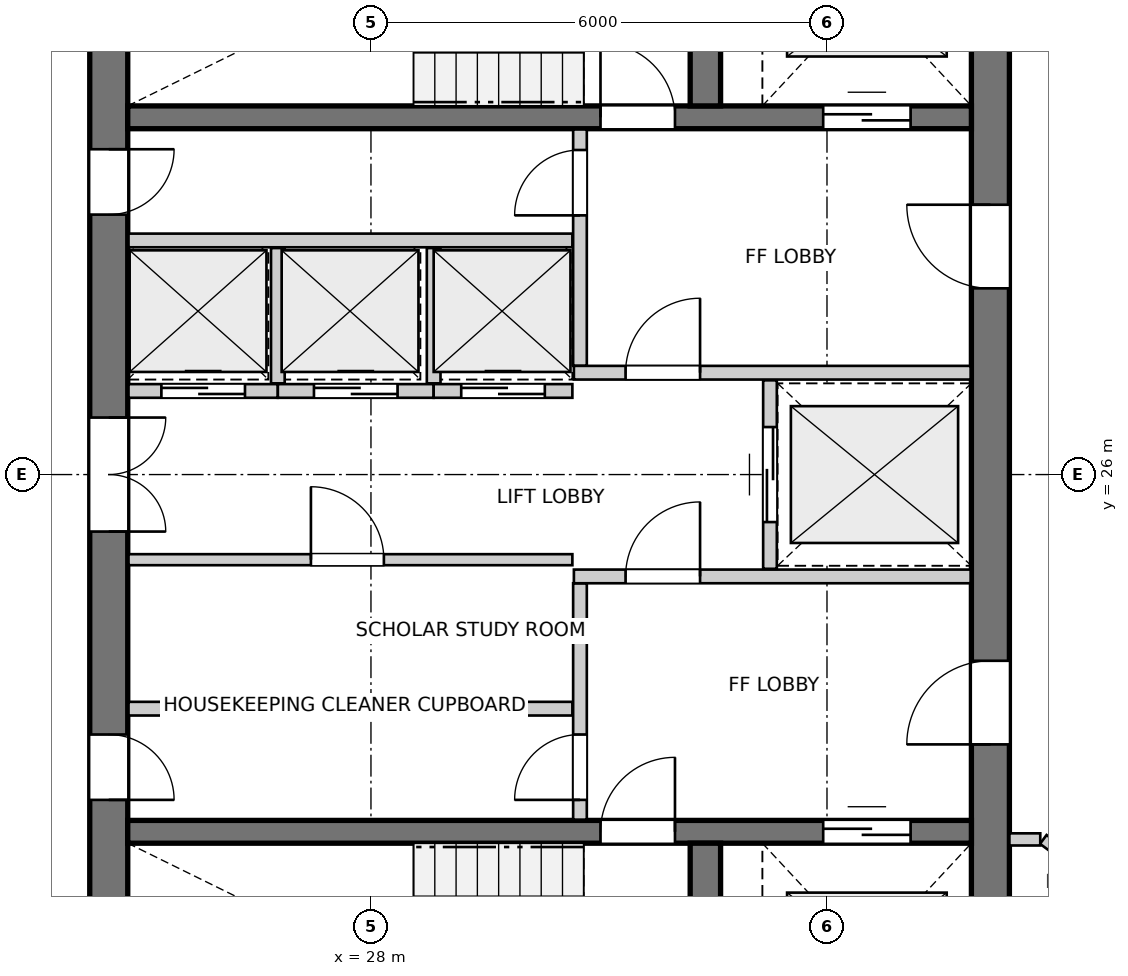
"""IFC4 building model, lengths in metres.
Left out: names, types, materials, properties, quantities, classifications, styles, units other than length and angle.
Written with IfcOpenShell. Run it as: python <this file> out.ifc"""

import sys

from ifc_helpers import new_model, si_unit, direction, frame, frame_2d, origin, place, context, subcontext, project, spatial, rectangle, extrude, source, transform, mapped, element, fill, save


model = new_model("IFC4")
c1 = context("Model", 3, precision=1e-05, world=origin(), true_north=direction((0.0, 1.0)))
c2 = subcontext(c1, "Body", "Model", "MODEL_VIEW")
j1 = project(units=[si_unit("LENGTHUNIT", "METRE"), si_unit("PLANEANGLEUNIT", "RADIAN")], contexts=[c1])
p1 = place(None, origin())
s1 = spatial("IfcSite", under=j1, at=p1, CompositionType="ELEMENT")
p2 = place(p1, origin())
s2 = spatial("IfcBuilding", under=s1, at=p2, CompositionType="ELEMENT")
p3 = place(p2, frame((0.0, 0.0, 195.6)))
s3 = spatial("IfcBuildingStorey", under=s2, at=p3, CompositionType="ELEMENT", Elevation=195.6)
p4 = place(p3, frame((24.55, 33.8, 0.0), z_axis=(0.0, 0.0, 1.0), x_axis=(0.0, -1.0, 0.0)))
e1 = element("IfcWall", 1, at=p4, inside=s3, PredefinedType="SHEAR", context=c2, shape_type="SweptSolid", body=[
    extrude(rectangle(XDim=15.6, YDim=0.5, at=frame_2d((7.8, 0.0))), origin(), (0.0, 0.0, 1.0), 2.96),
])
p5 = place(p4, frame((7.05, 0.0, 0.0)))
e2 = element("IfcOpeningElement", 2, at=p5, cuts=e1, PredefinedType="OPENING", context=c2, shape_type="SweptSolid", body=[
    extrude(rectangle(XDim=1.5, YDim=2.15, at=frame_2d((0.75, 1.075))), frame((0.0, 0.26, 0.0), z_axis=(0.0, -1.0, 0.0), x_axis=(1.0, 0.0, 0.0)), (0.0, 0.0, 1.0), 0.52),
])
p6 = place(p4, frame((3.52, 0.0, 0.0)))
e3 = element("IfcOpeningElement", 3, at=p6, cuts=e1, PredefinedType="OPENING", context=c2, shape_type="SweptSolid", body=[
    extrude(rectangle(XDim=0.86, YDim=2.05, at=frame_2d((0.43, 1.025))), frame((0.0, 0.26, 0.0), z_axis=(0.0, -1.0, 0.0), x_axis=(1.0, 0.0, 0.0)), (0.0, 0.0, 1.0), 0.52),
])
p7 = place(p4, frame((11.22, 0.0, 0.0)))
e4 = element("IfcOpeningElement", 4, at=p7, cuts=e1, PredefinedType="OPENING", context=c2, shape_type="SweptSolid", body=[
    extrude(rectangle(XDim=0.86, YDim=2.05, at=frame_2d((0.43, 1.025))), frame((0.0, 0.26, 0.0), z_axis=(0.0, -1.0, 0.0), x_axis=(1.0, 0.0, 0.0)), (0.0, 0.0, 1.0), 0.52),
])
p8 = place(p3, frame((36.15, 18.2, 0.0), z_axis=(0.0, 0.0, 1.0), x_axis=(0.0, 1.0, 0.0)))
e5 = element("IfcWall", 5, at=p8, inside=s3, PredefinedType="SHEAR", context=c2, shape_type="SweptSolid", body=[
    extrude(rectangle(XDim=15.6, YDim=0.5, at=frame_2d((7.8, 0.0))), origin(), (0.0, 0.0, 1.0), 2.96),
])
p9 = place(p8, frame((4.25, 0.0, 0.0)))
e6 = element("IfcOpeningElement", 6, at=p9, cuts=e5, PredefinedType="OPENING", context=c2, shape_type="SweptSolid", body=[
    extrude(rectangle(XDim=1.1, YDim=2.15, at=frame_2d((0.55, 1.075))), frame((0.0, 0.26, 0.0), z_axis=(0.0, -1.0, 0.0), x_axis=(1.0, 0.0, 0.0)), (0.0, 0.0, 1.0), 0.52),
])
p10 = place(p8, frame((10.25, 0.0, 0.0)))
e7 = element("IfcOpeningElement", 7, at=p10, cuts=e5, PredefinedType="OPENING", context=c2, shape_type="SweptSolid", body=[
    extrude(rectangle(XDim=1.1, YDim=2.15, at=frame_2d((0.55, 1.075))), frame((0.0, 0.26, 0.0), z_axis=(0.0, -1.0, 0.0), x_axis=(1.0, 0.0, 0.0)), (0.0, 0.0, 1.0), 0.52),
])
p11 = place(p3, frame((24.8, 21.3, 0.0), z_axis=(0.0, 0.0, 1.0), x_axis=(1.0, 0.0, 0.0)))
e8 = element("IfcWall", 8, at=p11, inside=s3, PredefinedType="SHEAR", context=c2, shape_type="SweptSolid", body=[
    extrude(rectangle(XDim=11.1, YDim=0.3, at=frame_2d((5.55, 0.0))), origin(), (0.0, 0.0, 1.0), 2.96),
])
p12 = place(p11, frame((6.22, 0.0, 0.0)))
e9 = element("IfcOpeningElement", 9, at=p12, cuts=e8, PredefinedType="OPENING", context=c2, shape_type="SweptSolid", body=[
    extrude(rectangle(XDim=0.98, YDim=2.15, at=frame_2d((0.49, 1.075))), frame((0.0, 0.16, 0.0), z_axis=(0.0, -1.0, 0.0), x_axis=(1.0, 0.0, 0.0)), (0.0, 0.0, 1.0), 0.32),
])
p13 = place(p11, frame((9.15, 0.0, 0.0)))
e10 = element("IfcOpeningElement", 10, at=p13, cuts=e8, PredefinedType="OPENING", context=c2, shape_type="SweptSolid", body=[
    extrude(rectangle(XDim=1.15, YDim=2.15, at=frame_2d((0.575, 1.075))), frame((0.0, 0.16, 0.0), z_axis=(0.0, -1.0, 0.0), x_axis=(1.0, 0.0, 0.0)), (0.0, 0.0, 1.0), 0.32),
])
p14 = place(p3, frame((32.4, 18.2, 0.0), z_axis=(0.0, 0.0, 1.0), x_axis=(0.0, 1.0, 0.0)))
e11 = element("IfcWall", 11, at=p14, inside=s3, PredefinedType="SHEAR", context=c2, shape_type="SweptSolid", body=[
    extrude(rectangle(XDim=2.95, YDim=0.4, at=frame_2d((1.475, 0.0))), origin(), (0.0, 0.0, 1.0), 2.96),
])
p15 = place(p3, frame((24.8, 30.7, 0.0), z_axis=(0.0, 0.0, 1.0), x_axis=(1.0, 0.0, 0.0)))
e12 = element("IfcWall", 12, at=p15, inside=s3, PredefinedType="SHEAR", context=c2, shape_type="SweptSolid", body=[
    extrude(rectangle(XDim=11.1, YDim=0.3, at=frame_2d((5.55, 0.0))), origin(), (0.0, 0.0, 1.0), 2.96),
])
p16 = place(p15, frame((6.22, 0.0, 0.0)))
e13 = element("IfcOpeningElement", 13, at=p16, cuts=e12, PredefinedType="OPENING", context=c2, shape_type="SweptSolid", body=[
    extrude(rectangle(XDim=0.98, YDim=2.15, at=frame_2d((0.49, 1.075))), frame((0.0, 0.16, 0.0), z_axis=(0.0, -1.0, 0.0), x_axis=(1.0, 0.0, 0.0)), (0.0, 0.0, 1.0), 0.32),
])
p17 = place(p15, frame((9.15, 0.0, 0.0)))
e14 = element("IfcOpeningElement", 14, at=p17, cuts=e12, PredefinedType="OPENING", context=c2, shape_type="SweptSolid", body=[
    extrude(rectangle(XDim=1.15, YDim=2.15, at=frame_2d((0.575, 1.075))), frame((0.0, 0.16, 0.0), z_axis=(0.0, -1.0, 0.0), x_axis=(1.0, 0.0, 0.0)), (0.0, 0.0, 1.0), 0.32),
])
p18 = place(p3, frame((32.4, 30.85, 0.0), z_axis=(0.0, 0.0, 1.0), x_axis=(0.0, 1.0, 0.0)))
e15 = element("IfcWall", 15, at=p18, inside=s3, PredefinedType="SHEAR", context=c2, shape_type="SweptSolid", body=[
    extrude(rectangle(XDim=2.95, YDim=0.4, at=frame_2d((1.475, 0.0))), origin(), (0.0, 0.0, 1.0), 2.96),
])
p19 = place(p3, frame((30.75, 21.46, 0.0), z_axis=(0.0, 0.0, 1.0), x_axis=(0.0, 1.0, 0.0)))
e16 = element("IfcWall", 16, at=p19, inside=s3, PredefinedType="PARTITIONING", context=c2, shape_type="SweptSolid", body=[
    extrude(rectangle(XDim=3.11, YDim=0.18, at=frame_2d((1.555, 0.0))), origin(), (0.0, 0.0, 1.0), 2.96),
])
p20 = place(p19, frame((0.26, 0.0, 0.0)))
e17 = element("IfcOpeningElement", 17, at=p20, cuts=e16, PredefinedType="OPENING", context=c2, shape_type="SweptSolid", body=[
    extrude(rectangle(XDim=0.86, YDim=2.05, at=frame_2d((0.43, 1.025))), frame((0.0, 0.1, 0.0), z_axis=(0.0, -1.0, 0.0), x_axis=(1.0, 0.0, 0.0)), (0.0, 0.0, 1.0), 0.2),
])
p21 = place(p3, frame((30.67, 24.66, 0.0), z_axis=(0.0, 0.0, 1.0), x_axis=(1.0, 0.0, 0.0)))
e18 = element("IfcWall", 18, at=p21, inside=s3, PredefinedType="PARTITIONING", context=c2, shape_type="SweptSolid", body=[
    extrude(rectangle(XDim=5.22, YDim=0.18, at=frame_2d((2.61, 0.0))), origin(), (0.0, 0.0, 1.0), 2.96),
])
p22 = place(p21, frame((0.68, 0.0, 0.0)))
e19 = element("IfcOpeningElement", 19, at=p22, cuts=e18, PredefinedType="OPENING", context=c2, shape_type="SweptSolid", body=[
    extrude(rectangle(XDim=0.98, YDim=2.15, at=frame_2d((0.49, 1.075))), frame((0.0, 0.1, 0.0), z_axis=(0.0, -1.0, 0.0), x_axis=(1.0, 0.0, 0.0)), (0.0, 0.0, 1.0), 0.2),
])
p23 = place(p3, frame((30.75, 27.43, 0.0), z_axis=(0.0, 0.0, 1.0), x_axis=(0.0, 1.0, 0.0)))
e20 = element("IfcWall", 20, at=p23, inside=s3, PredefinedType="PARTITIONING", context=c2, shape_type="SweptSolid", body=[
    extrude(rectangle(XDim=3.11, YDim=0.18, at=frame_2d((1.555, 0.0))), origin(), (0.0, 0.0, 1.0), 2.96),
])
p24 = place(p23, frame((1.98, 0.0, 0.0)))
e21 = element("IfcOpeningElement", 21, at=p24, cuts=e20, PredefinedType="OPENING", context=c2, shape_type="SweptSolid", body=[
    extrude(rectangle(XDim=0.86, YDim=2.05, at=frame_2d((0.43, 1.025))), frame((0.0, 0.1, 0.0), z_axis=(0.0, -1.0, 0.0), x_axis=(1.0, 0.0, 0.0)), (0.0, 0.0, 1.0), 0.2),
])
p25 = place(p3, frame((30.67, 27.34, 0.0), z_axis=(0.0, 0.0, 1.0), x_axis=(1.0, 0.0, 0.0)))
e22 = element("IfcWall", 22, at=p25, inside=s3, PredefinedType="PARTITIONING", context=c2, shape_type="SweptSolid", body=[
    extrude(rectangle(XDim=5.22, YDim=0.18, at=frame_2d((2.61, 0.0))), origin(), (0.0, 0.0, 1.0), 2.96),
])
p26 = place(p25, frame((0.68, 0.0, 0.0)))
e23 = element("IfcOpeningElement", 23, at=p26, cuts=e22, PredefinedType="OPENING", context=c2, shape_type="SweptSolid", body=[
    extrude(rectangle(XDim=0.98, YDim=2.15, at=frame_2d((0.49, 1.075))), frame((0.0, 0.1, 0.0), z_axis=(0.0, -1.0, 0.0), x_axis=(1.0, 0.0, 0.0)), (0.0, 0.0, 1.0), 0.2),
])
p27 = place(p3, frame((33.25, 24.76, 0.0), z_axis=(0.0, 0.0, 1.0), x_axis=(0.0, 1.0, 0.0)))
e24 = element("IfcWall", 24, at=p27, inside=s3, PredefinedType="PARTITIONING", context=c2, shape_type="SweptSolid", body=[
    extrude(rectangle(XDim=2.48, YDim=0.18, at=frame_2d((1.24, 0.0))), origin(), (0.0, 0.0, 1.0), 2.96),
])
p28 = place(p27, frame((0.615, 0.0, 0.0)))
e25 = element("IfcOpeningElement", 25, at=p28, cuts=e24, PredefinedType="OPENING", context=c2, shape_type="SweptSolid", body=[
    extrude(rectangle(XDim=1.25, YDim=2.15, at=frame_2d((0.625, 1.075))), frame((0.0, 0.1, 0.0), z_axis=(0.0, -1.0, 0.0), x_axis=(1.0, 0.0, 0.0)), (0.0, 0.0, 1.0), 0.2),
])
p29 = place(p3, frame((24.81, 22.92, 0.0), z_axis=(0.0, 0.0, 1.0), x_axis=(1.0, 0.0, 0.0)))
e26 = element("IfcWall", 26, at=p29, inside=s3, PredefinedType="PARTITIONING", context=c2, shape_type="SweptSolid", body=[
    extrude(rectangle(XDim=5.84, YDim=0.18, at=frame_2d((2.92, 0.0))), origin(), (0.0, 0.0, 1.0), 2.96),
])
p30 = place(p3, frame((24.81, 24.88, 0.0), z_axis=(0.0, 0.0, 1.0), x_axis=(1.0, 0.0, 0.0)))
e27 = element("IfcWall", 27, at=p30, inside=s3, PredefinedType="PARTITIONING", context=c2, shape_type="SweptSolid", body=[
    extrude(rectangle(XDim=5.84, YDim=0.145, at=frame_2d((2.92, 0.0))), origin(), (0.0, 0.0, 1.0), 2.96),
])
p31 = place(p30, frame((2.4, 0.0, 0.0)))
e28 = element("IfcOpeningElement", 28, at=p31, cuts=e27, PredefinedType="OPENING", context=c2, shape_type="SweptSolid", body=[
    extrude(rectangle(XDim=0.96, YDim=2.1, at=frame_2d((0.48, 1.05))), frame((0.0, 0.083, 0.0), z_axis=(0.0, -1.0, 0.0), x_axis=(1.0, 0.0, 0.0)), (0.0, 0.0, 1.0), 0.165),
])
p32 = place(p3, frame((24.81, 29.08, 0.0), z_axis=(0.0, 0.0, 1.0), x_axis=(1.0, 0.0, 0.0)))
e29 = element("IfcWall", 29, at=p32, inside=s3, PredefinedType="PARTITIONING", context=c2, shape_type="SweptSolid", body=[
    extrude(rectangle(XDim=5.84, YDim=0.18, at=frame_2d((2.92, 0.0))), origin(), (0.0, 0.0, 1.0), 2.96),
])
p33 = place(p3, frame((24.81, 27.1, 0.0), z_axis=(0.0, 0.0, 1.0), x_axis=(1.0, 0.0, 0.0)))
e30 = element("IfcWall", 30, at=p33, inside=s3, PredefinedType="PARTITIONING", context=c2, shape_type="SweptSolid", body=[
    extrude(rectangle(XDim=1.965, YDim=0.18, at=frame_2d((0.982, 0.0))), origin(), (0.0, 0.0, 1.0), 2.96),
])
p34 = place(p33, frame((0.433, 0.0, 0.0)))
e31 = element("IfcOpeningElement", 31, at=p34, cuts=e30, PredefinedType="OPENING", context=c2, shape_type="SweptSolid", body=[
    extrude(rectangle(XDim=1.1, YDim=2.15, at=frame_2d((0.55, 1.075))), frame((0.0, 0.1, 0.0), z_axis=(0.0, -1.0, 0.0), x_axis=(1.0, 0.0, 0.0)), (0.0, 0.0, 1.0), 0.2),
])
p35 = place(p3, frame((26.775, 27.1, 0.0), z_axis=(0.0, 0.0, 1.0), x_axis=(1.0, 0.0, 0.0)))
e32 = element("IfcWall", 32, at=p35, inside=s3, PredefinedType="PARTITIONING", context=c2, shape_type="SweptSolid", body=[
    extrude(rectangle(XDim=2.05, YDim=0.18, at=frame_2d((1.025, 0.0))), origin(), (0.0, 0.0, 1.0), 2.96),
])
p36 = place(p35, frame((0.475, 0.0, 0.0)))
e33 = element("IfcOpeningElement", 33, at=p36, cuts=e32, PredefinedType="OPENING", context=c2, shape_type="SweptSolid", body=[
    extrude(rectangle(XDim=1.1, YDim=2.15, at=frame_2d((0.55, 1.075))), frame((0.0, 0.1, 0.0), z_axis=(0.0, -1.0, 0.0), x_axis=(1.0, 0.0, 0.0)), (0.0, 0.0, 1.0), 0.2),
])
p37 = place(p3, frame((26.775, 27.2, 0.0), z_axis=(0.0, 0.0, 1.0), x_axis=(0.0, 1.0, 0.0)))
e34 = element("IfcWall", 34, at=p37, inside=s3, PredefinedType="PARTITIONING", context=c2, shape_type="SweptSolid", body=[
    extrude(rectangle(XDim=1.78, YDim=0.18, at=frame_2d((0.89, 0.0))), origin(), (0.0, 0.0, 1.0), 2.96),
])
p38 = place(p3, frame((28.825, 27.1, 0.0), z_axis=(0.0, 0.0, 1.0), x_axis=(1.0, 0.0, 0.0)))
e35 = element("IfcWall", 35, at=p38, inside=s3, PredefinedType="PARTITIONING", context=c2, shape_type="SweptSolid", body=[
    extrude(rectangle(XDim=1.825, YDim=0.18, at=frame_2d((0.913, 0.0))), origin(), (0.0, 0.0, 1.0), 2.96),
])
p39 = place(p38, frame((0.363, 0.0, 0.0)))
e36 = element("IfcOpeningElement", 36, at=p39, cuts=e35, PredefinedType="OPENING", context=c2, shape_type="SweptSolid", body=[
    extrude(rectangle(XDim=1.1, YDim=2.15, at=frame_2d((0.55, 1.075))), frame((0.0, 0.1, 0.0), z_axis=(0.0, -1.0, 0.0), x_axis=(1.0, 0.0, 0.0)), (0.0, 0.0, 1.0), 0.2),
])
p40 = place(p3, frame((28.825, 27.2, 0.0), z_axis=(0.0, 0.0, 1.0), x_axis=(0.0, 1.0, 0.0)))
e37 = element("IfcWall", 37, at=p40, inside=s3, PredefinedType="PARTITIONING", context=c2, shape_type="SweptSolid", body=[
    extrude(rectangle(XDim=1.78, YDim=0.18, at=frame_2d((0.89, 0.0))), origin(), (0.0, 0.0, 1.0), 2.96),
])
p41 = place(p3, frame((36.846, 21.2, 0.0), z_axis=(0.0, 0.0, 1.0), x_axis=(0.804250382672, -0.594290603974, 0.0)))
e38 = element("IfcWall", 38, at=p41, inside=s3, PredefinedType="PARTITIONING", context=c2, shape_type="SweptSolid", body=[
    extrude(rectangle(XDim=1.777, YDim=0.145, at=frame_2d((0.888, 0.0))), origin(), (0.0, 0.0, 1.0), 2.96),
])
p42 = place(p3, frame((36.4, 21.2, 0.0), z_axis=(0.0, 0.0, 1.0), x_axis=(1.0, 0.0, 0.0)))
e39 = element("IfcWall", 39, at=p42, inside=s3, PredefinedType="PARTITIONING", context=c2, shape_type="SweptSolid", body=[
    extrude(rectangle(XDim=0.406, YDim=0.16, at=frame_2d((0.203, 0.0))), origin(), (0.0, 0.0, 1.0), 2.96),
])
m1 = source(origin(), c2, "Body", "SweptSolid", [
    extrude(rectangle(XDim=0.98, YDim=2.15, at=frame_2d((0.49, 1.075))), frame((0.0, 0.025, 0.0), z_axis=(0.0, -1.0, 0.0), x_axis=(1.0, 0.0, 0.0)), (0.0, 0.0, 1.0), 0.05),
])
p43 = place(p12, origin())
e40 = element("IfcDoor", 40, at=p43, inside=s3, OperationType="SINGLE_SWING_RIGHT", PredefinedType="DOOR", context=c2, shape_type="MappedRepresentation", body=[
    mapped(m1, transform((0.0, 0.0, 0.0), x_axis=(1.0, 0.0, 0.0), y_axis=(0.0, 1.0, 0.0), z_axis=(0.0, 0.0, 1.0), scale=1.0)),
])
fill(e9, e40)
m2 = source(origin(), c2, "Body", "SweptSolid", [
    extrude(rectangle(XDim=1.15, YDim=2.15, at=frame_2d((0.575, 1.075))), frame((0.0, 0.025, 0.0), z_axis=(0.0, -1.0, 0.0), x_axis=(1.0, 0.0, 0.0)), (0.0, 0.0, 1.0), 0.05),
])
p44 = place(p13, origin())
e41 = element("IfcDoor", 41, at=p44, inside=s3, OperationType="DOUBLE_DOOR_SLIDING", PredefinedType="DOOR", context=c2, shape_type="MappedRepresentation", body=[
    mapped(m2, transform((0.0, 0.0, 0.0), x_axis=(1.0, 0.0, 0.0), y_axis=(0.0, 1.0, 0.0), z_axis=(0.0, 0.0, 1.0), scale=1.0)),
])
fill(e10, e41)
p45 = place(p16, origin())
e42 = element("IfcDoor", 42, at=p45, inside=s3, OperationType="SINGLE_SWING_LEFT", PredefinedType="DOOR", context=c2, shape_type="MappedRepresentation", body=[
    mapped(m1, transform((0.0, 0.0, 0.0), x_axis=(1.0, 0.0, 0.0), y_axis=(0.0, 1.0, 0.0), z_axis=(0.0, 0.0, 1.0), scale=1.0)),
])
fill(e13, e42)
p46 = place(p17, origin())
e43 = element("IfcDoor", 43, at=p46, inside=s3, OperationType="DOUBLE_DOOR_SLIDING", PredefinedType="DOOR", context=c2, shape_type="MappedRepresentation", body=[
    mapped(m2, transform((0.0, 0.0, 0.0), x_axis=(1.0, 0.0, 0.0), y_axis=(0.0, 1.0, 0.0), z_axis=(0.0, 0.0, 1.0), scale=1.0)),
])
fill(e14, e43)
m3 = source(origin(), c2, "Body", "SweptSolid", [
    extrude(rectangle(XDim=1.1, YDim=2.15, at=frame_2d((0.55, 1.075))), frame((0.0, 0.025, 0.0), z_axis=(0.0, -1.0, 0.0), x_axis=(1.0, 0.0, 0.0)), (0.0, 0.0, 1.0), 0.05),
])
p47 = place(p9, origin())
e44 = element("IfcDoor", 44, at=p47, inside=s3, OperationType="SINGLE_SWING_LEFT", PredefinedType="DOOR", context=c2, shape_type="MappedRepresentation", body=[
    mapped(m3, transform((0.0, 0.0, 0.0), x_axis=(1.0, 0.0, 0.0), y_axis=(0.0, 1.0, 0.0), z_axis=(0.0, 0.0, 1.0), scale=1.0)),
])
fill(e6, e44)
p48 = place(p10, origin())
e45 = element("IfcDoor", 45, at=p48, inside=s3, OperationType="SINGLE_SWING_RIGHT", PredefinedType="DOOR", context=c2, shape_type="MappedRepresentation", body=[
    mapped(m3, transform((0.0, 0.0, 0.0), x_axis=(1.0, 0.0, 0.0), y_axis=(0.0, 1.0, 0.0), z_axis=(0.0, 0.0, 1.0), scale=1.0)),
])
fill(e7, e45)
m4 = source(origin(), c2, "Body", "SweptSolid", [
    extrude(rectangle(XDim=1.5, YDim=2.15, at=frame_2d((0.75, 1.075))), frame((0.0, 0.025, 0.0), z_axis=(0.0, -1.0, 0.0), x_axis=(1.0, 0.0, 0.0)), (0.0, 0.0, 1.0), 0.05),
])
p49 = place(p5, origin())
e46 = element("IfcDoor", 46, at=p49, inside=s3, OperationType="DOUBLE_DOOR_SINGLE_SWING", PredefinedType="DOOR", context=c2, shape_type="MappedRepresentation", body=[
    mapped(m4, transform((0.0, 0.0, 0.0), x_axis=(1.0, 0.0, 0.0), y_axis=(0.0, 1.0, 0.0), z_axis=(0.0, 0.0, 1.0), scale=1.0)),
])
fill(e2, e46)
m5 = source(origin(), c2, "Body", "SweptSolid", [
    extrude(rectangle(XDim=0.86, YDim=2.05, at=frame_2d((0.43, 1.025))), frame((0.0, 0.025, 0.0), z_axis=(0.0, -1.0, 0.0), x_axis=(1.0, 0.0, 0.0)), (0.0, 0.0, 1.0), 0.05),
])
p50 = place(p6, origin())
e47 = element("IfcDoor", 47, at=p50, inside=s3, OperationType="SINGLE_SWING_LEFT", PredefinedType="DOOR", context=c2, shape_type="MappedRepresentation", body=[
    mapped(m5, transform((0.0, 0.0, 0.0), x_axis=(1.0, 0.0, 0.0), y_axis=(0.0, 1.0, 0.0), z_axis=(0.0, 0.0, 1.0), scale=1.0)),
])
fill(e3, e47)
p51 = place(p7, origin())
e48 = element("IfcDoor", 48, at=p51, inside=s3, OperationType="SINGLE_SWING_RIGHT", PredefinedType="DOOR", context=c2, shape_type="MappedRepresentation", body=[
    mapped(m5, transform((0.0, 0.0, 0.0), x_axis=(1.0, 0.0, 0.0), y_axis=(0.0, 1.0, 0.0), z_axis=(0.0, 0.0, 1.0), scale=1.0)),
])
fill(e4, e48)
p52 = place(p20, origin())
e49 = element("IfcDoor", 49, at=p52, inside=s3, OperationType="SINGLE_SWING_LEFT", PredefinedType="DOOR", context=c2, shape_type="MappedRepresentation", body=[
    mapped(m5, transform((0.0, 0.0, 0.0), x_axis=(1.0, 0.0, 0.0), y_axis=(0.0, 1.0, 0.0), z_axis=(0.0, 0.0, 1.0), scale=1.0)),
])
fill(e17, e49)
p53 = place(p22, origin())
e50 = element("IfcDoor", 50, at=p53, inside=s3, OperationType="SINGLE_SWING_RIGHT", PredefinedType="DOOR", context=c2, shape_type="MappedRepresentation", body=[
    mapped(m1, transform((0.0, 0.0, 0.0), x_axis=(1.0, 0.0, 0.0), y_axis=(0.0, 1.0, 0.0), z_axis=(0.0, 0.0, 1.0), scale=1.0)),
])
fill(e19, e50)
p54 = place(p24, origin())
e51 = element("IfcDoor", 51, at=p54, inside=s3, OperationType="SINGLE_SWING_LEFT", PredefinedType="DOOR", context=c2, shape_type="MappedRepresentation", body=[
    mapped(m5, transform((0.0, 0.0, 0.0), x_axis=(1.0, 0.0, 0.0), y_axis=(0.0, 1.0, 0.0), z_axis=(0.0, 0.0, 1.0), scale=1.0)),
])
fill(e21, e51)
p55 = place(p26, origin())
e52 = element("IfcDoor", 52, at=p55, inside=s3, OperationType="SINGLE_SWING_RIGHT", PredefinedType="DOOR", context=c2, shape_type="MappedRepresentation", body=[
    mapped(m1, transform((0.0, 0.0, 0.0), x_axis=(1.0, 0.0, 0.0), y_axis=(0.0, 1.0, 0.0), z_axis=(0.0, 0.0, 1.0), scale=1.0)),
])
fill(e23, e52)
m6 = source(origin(), c2, "Body", "SweptSolid", [
    extrude(rectangle(XDim=1.25, YDim=2.15, at=frame_2d((0.625, 1.075))), frame((0.0, 0.025, 0.0), z_axis=(0.0, -1.0, 0.0), x_axis=(1.0, 0.0, 0.0)), (0.0, 0.0, 1.0), 0.05),
])
p56 = place(p28, origin())
e53 = element("IfcDoor", 53, at=p56, inside=s3, OperationType="DOUBLE_DOOR_SLIDING", PredefinedType="DOOR", context=c2, shape_type="MappedRepresentation", body=[
    mapped(m6, transform((0.0, 0.0, 0.0), x_axis=(1.0, 0.0, 0.0), y_axis=(0.0, 1.0, 0.0), z_axis=(0.0, 0.0, 1.0), scale=1.0)),
])
fill(e25, e53)
m7 = source(origin(), c2, "Body", "SweptSolid", [
    extrude(rectangle(XDim=0.96, YDim=2.1, at=frame_2d((0.48, 1.05))), frame((0.0, 0.025, 0.0), z_axis=(0.0, -1.0, 0.0), x_axis=(1.0, 0.0, 0.0)), (0.0, 0.0, 1.0), 0.05),
])
p57 = place(p31, origin())
e54 = element("IfcDoor", 54, at=p57, inside=s3, OperationType="SINGLE_SWING_LEFT", PredefinedType="DOOR", context=c2, shape_type="MappedRepresentation", body=[
    mapped(m7, transform((0.0, 0.0, 0.0), x_axis=(1.0, 0.0, 0.0), y_axis=(0.0, 1.0, 0.0), z_axis=(0.0, 0.0, 1.0), scale=1.0)),
])
fill(e28, e54)
p58 = place(p34, origin())
e55 = element("IfcDoor", 55, at=p58, inside=s3, OperationType="DOUBLE_DOOR_SLIDING", PredefinedType="DOOR", context=c2, shape_type="MappedRepresentation", body=[
    mapped(m3, transform((0.0, 0.0, 0.0), x_axis=(1.0, 0.0, 0.0), y_axis=(0.0, 1.0, 0.0), z_axis=(0.0, 0.0, 1.0), scale=1.0)),
])
fill(e31, e55)
p59 = place(p36, origin())
e56 = element("IfcDoor", 56, at=p59, inside=s3, OperationType="DOUBLE_DOOR_SLIDING", PredefinedType="DOOR", context=c2, shape_type="MappedRepresentation", body=[
    mapped(m3, transform((0.0, 0.0, 0.0), x_axis=(1.0, 0.0, 0.0), y_axis=(0.0, 1.0, 0.0), z_axis=(0.0, 0.0, 1.0), scale=1.0)),
])
fill(e33, e56)
p60 = place(p39, origin())
e57 = element("IfcDoor", 57, at=p60, inside=s3, OperationType="DOUBLE_DOOR_SLIDING", PredefinedType="DOOR", context=c2, shape_type="MappedRepresentation", body=[
    mapped(m3, transform((0.0, 0.0, 0.0), x_axis=(1.0, 0.0, 0.0), y_axis=(0.0, 1.0, 0.0), z_axis=(0.0, 0.0, 1.0), scale=1.0)),
])
fill(e36, e57)
save(model, sys.argv[1])
